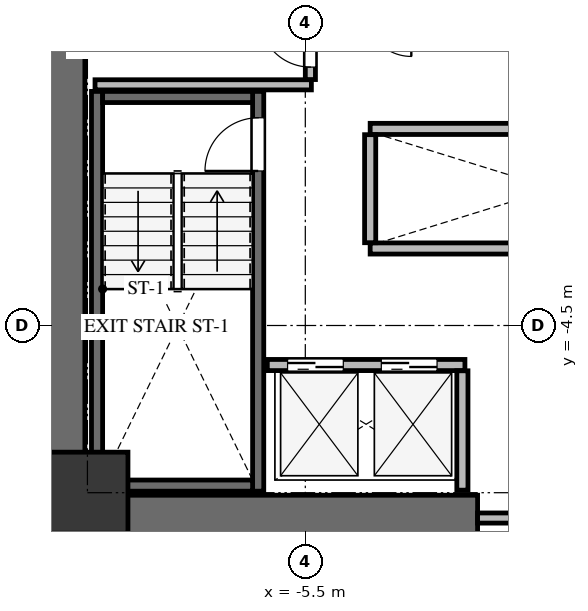
"""IFC4 building model, lengths in metres.
Left out: names, types, materials, properties, quantities, classifications, styles, units other than length and angle.
Written with IfcOpenShell. Run it as: python <this file> out.ifc"""

import sys

from ifc_helpers import new_model, si_unit, direction, frame, frame_2d, origin, origin_2d, place, context, subcontext, project, spatial, rectangle, extrude, source, transform, mapped, element, fill, save


model = new_model("IFC4")
c1 = context("Model", 3, precision=1e-05, world=origin(), true_north=direction((0.0, 1.0)))
c2 = subcontext(c1, "Body", "Model", "MODEL_VIEW")
j1 = project(units=[si_unit("LENGTHUNIT", "METRE"), si_unit("PLANEANGLEUNIT", "RADIAN")], contexts=[c1])
p1 = place(None, origin())
s1 = spatial("IfcSite", under=j1, at=p1, CompositionType="ELEMENT")
p2 = place(p1, origin())
s2 = spatial("IfcBuilding", under=s1, at=p2, CompositionType="ELEMENT")
p3 = place(p2, frame((0.0, 0.0, 75.3)))
s3 = spatial("IfcBuildingStorey", under=s2, at=p3, CompositionType="ELEMENT", Elevation=75.3)
p4 = place(p3, frame((-10.3, -8.75, 0.0), z_axis=(0.0, 0.0, 1.0), x_axis=(0.0, 1.0, 0.0)))
e1 = element("IfcWall", 1, at=p4, inside=s3, PredefinedType="SHEAR", context=c2, shape_type="SweptSolid", body=[
    extrude(rectangle(XDim=17.5, YDim=0.9, at=frame_2d((8.75, 0.0))), origin(), (0.0, 0.0, 1.0), 3.0),
])
p5 = place(p3, frame((-9.85, -8.3, 0.0), z_axis=(0.0, 0.0, 1.0), x_axis=(1.0, 0.0, 0.0)))
e2 = element("IfcWall", 2, at=p5, inside=s3, PredefinedType="SHEAR", context=c2, shape_type="SweptSolid", body=[
    extrude(rectangle(XDim=7.75, YDim=0.9, at=frame_2d((3.875, 0.0))), origin(), (0.0, 0.0, 1.0), 3.0),
])
p6 = place(p3, frame((-6.43, -7.77, -0.24), z_axis=(0.0, 0.0, 1.0), x_axis=(0.0, 1.0, 0.0)))
e3 = element("IfcWall", 3, at=p6, inside=s3, PredefinedType="SHEAR", context=c2, shape_type="SweptSolid", body=[
    extrude(rectangle(XDim=7.89, YDim=0.22, at=frame_2d((3.945, 0.0))), origin(), (0.0, 0.0, 1.0), 3.0),
])
p7 = place(p6, frame((6.32, 0.0, 0.0)))
e4 = element("IfcOpeningElement", 4, at=p7, cuts=e3, PredefinedType="OPENING", context=c2, shape_type="SweptSolid", body=[
    extrude(rectangle(XDim=1.05, YDim=2.15, at=frame_2d((0.525, 1.075))), frame((0.0, 0.12, 0.0), z_axis=(0.0, -1.0, 0.0), x_axis=(1.0, 0.0, 0.0)), (0.0, 0.0, 1.0), 0.24),
])
p8 = place(p3, frame((-9.61, 0.12, -0.24), z_axis=(0.0, 0.0, 1.0), x_axis=(0.0, -1.0, 0.0)))
e5 = element("IfcWall", 5, at=p8, inside=s3, PredefinedType="SHEAR", context=c2, shape_type="SweptSolid", body=[
    extrude(rectangle(XDim=7.89, YDim=0.22, at=frame_2d((3.945, 0.0))), origin(), (0.0, 0.0, 1.0), 3.0),
])
for number, where, z_axis, x_axis in (
    (6, (-9.5, -7.66, -0.24), (0.0, 0.0, 1.0), (1.0, 0.0, 0.0)),
    (7, (-6.54, 0.01, -0.24), (0.0, 0.0, 1.0), (-1.0, 0.0, 0.0)),
):
    element("IfcWall", number, at=place(p3, frame(where, z_axis=z_axis, x_axis=x_axis)), inside=s3, PredefinedType="SHEAR", context=c2, shape_type="SweptSolid", body=[
        extrude(rectangle(XDim=2.96, YDim=0.22, at=frame_2d((1.48, 0.0))), origin(), (0.0, 0.0, 1.0), 3.0),
    ])
m1 = source(origin(), c2, "Body", "SweptSolid", [
    extrude(rectangle(XDim=1.6, YDim=1.6, at=origin_2d()), origin(), (0.0, 0.0, 1.0), 3.0),
])
p9 = place(p3, frame((-9.8, -7.8, -0.24), z_axis=(0.0, 0.0, 1.0), x_axis=(1.0, 0.0, 0.0)))
e8 = element("IfcColumn", 8, at=p9, inside=s3, PredefinedType="COLUMN", context=c2, shape_type="MappedRepresentation", body=[
    mapped(m1, transform((0.0, 0.0, 0.0), x_axis=(1.0, 0.0, 0.0), y_axis=(0.0, 1.0, 0.0), z_axis=(0.0, 0.0, 1.0), scale=1.0)),
])
p10 = place(p3, frame((-2.1, -8.3, 0.0), z_axis=(0.0, 0.0, 1.0), x_axis=(1.0, 0.0, 0.0)))
e9 = element("IfcWall", 9, at=p10, inside=s3, PredefinedType="SOLIDWALL", context=c2, shape_type="SweptSolid", body=[
    extrude(rectangle(XDim=4.2, YDim=0.2, at=frame_2d((2.1, 0.0))), origin(), (0.0, 0.0, 1.0), 2.745),
])
p11 = place(p10, frame((1.2, 0.0, 0.0)))
e10 = element("IfcOpeningElement", 10, at=p11, cuts=e9, PredefinedType="OPENING", context=c2, shape_type="SweptSolid", body=[
    extrude(rectangle(XDim=1.8, YDim=2.15, at=frame_2d((0.9, 1.075))), frame((0.0, 0.11, 0.0), z_axis=(0.0, -1.0, 0.0), x_axis=(1.0, 0.0, 0.0)), (0.0, 0.0, 1.0), 0.22),
])
p12 = place(p3, frame((-9.65, 0.25, 0.0), z_axis=(0.0, 0.0, 1.0), x_axis=(1.0, 0.0, 0.0)))
e11 = element("IfcWall", 11, at=p12, inside=s3, PredefinedType="SOLIDWALL", context=c2, shape_type="SweptSolid", body=[
    extrude(rectangle(XDim=4.27, YDim=0.2, at=frame_2d((2.135, 0.0))), origin(), (0.0, 0.0, 1.0), 2.745),
])
p13 = place(p3, frame((-5.4, 0.354, 0.0), z_axis=(0.0, 0.0, 1.0), x_axis=(0.0, 1.0, 0.0)))
e12 = element("IfcWall", 12, at=p13, inside=s3, PredefinedType="SOLIDWALL", context=c2, shape_type="SweptSolid", body=[
    extrude(rectangle(XDim=4.026, YDim=0.2, at=frame_2d((2.013, 0.0))), origin(), (0.0, 0.0, 1.0), 2.745),
])
p14 = place(p13, frame((0.246, 0.0, 0.0)))
e13 = element("IfcOpeningElement", 13, at=p14, cuts=e12, PredefinedType="OPENING", context=c2, shape_type="SweptSolid", body=[
    extrude(rectangle(XDim=1.0, YDim=2.15, at=frame_2d((0.5, 1.075))), frame((0.0, 0.11, 0.0), z_axis=(0.0, -1.0, 0.0), x_axis=(1.0, 0.0, 0.0)), (0.0, 0.0, 1.0), 0.22),
])
p15 = place(p3, frame((-6.25, -5.28, 0.0), z_axis=(0.0, 0.0, 1.0), x_axis=(1.0, 0.0, 0.0)))
e14 = element("IfcWall", 14, at=p15, inside=s3, PredefinedType="SOLIDWALL", context=c2, shape_type="SweptSolid", body=[
    extrude(rectangle(XDim=3.9, YDim=0.22, at=frame_2d((1.95, 0.0))), origin(), (0.0, 0.0, 1.0), 2.745),
])
p16 = place(p15, frame((0.4, 0.0, 0.0)))
e15 = element("IfcOpeningElement", 15, at=p16, cuts=e14, PredefinedType="OPENING", context=c2, shape_type="SweptSolid", body=[
    extrude(rectangle(XDim=1.1, YDim=2.15, at=frame_2d((0.55, 1.075))), frame((0.0, 0.12, 0.0), z_axis=(0.0, -1.0, 0.0), x_axis=(1.0, 0.0, 0.0)), (0.0, 0.0, 1.0), 0.24),
])
p17 = place(p15, frame((2.25, 0.0, 0.0)))
e16 = element("IfcOpeningElement", 16, at=p17, cuts=e14, PredefinedType="OPENING", context=c2, shape_type="SweptSolid", body=[
    extrude(rectangle(XDim=1.1, YDim=2.15, at=frame_2d((0.55, 1.075))), frame((0.0, 0.12, 0.0), z_axis=(0.0, -1.0, 0.0), x_axis=(1.0, 0.0, 0.0)), (0.0, 0.0, 1.0), 0.24),
])
p18 = place(p3, frame((-2.4, -7.75, 0.0), z_axis=(0.0, 0.0, 1.0), x_axis=(0.0, 1.0, 0.0)))
e17 = element("IfcWall", 17, at=p18, inside=s3, PredefinedType="SOLIDWALL", context=c2, shape_type="SweptSolid", body=[
    extrude(rectangle(XDim=2.356, YDim=0.22, at=frame_2d((1.178, 0.0))), origin(), (0.0, 0.0, 1.0), 2.745),
])
for number, where, z_axis, x_axis in (
    (18, (-4.22, -2.98, 0.0), (0.0, 0.0, 1.0), (1.0, 0.0, 0.0)),
    (19, (-4.22, -0.62, 0.0), (0.0, 0.0, 1.0), (1.0, 0.0, 0.0)),
):
    element("IfcWall", number, at=place(p3, frame(where, z_axis=z_axis, x_axis=x_axis)), inside=s3, PredefinedType="SOLIDWALL", context=c2, shape_type="SweptSolid", body=[
        extrude(rectangle(XDim=7.24, YDim=0.22, at=frame_2d((3.62, 0.0))), origin(), (0.0, 0.0, 1.0), 2.745),
    ])
p19 = place(p3, frame((-4.22, -2.866, 0.0), z_axis=(0.0, 0.0, 1.0), x_axis=(0.0, 1.0, 0.0)))
e20 = element("IfcWall", 20, at=p19, inside=s3, PredefinedType="SOLIDWALL", context=c2, shape_type="SweptSolid", body=[
    extrude(rectangle(XDim=2.132, YDim=0.22, at=frame_2d((1.066, 0.0))), origin(), (0.0, 0.0, 1.0), 2.745),
])
m2 = source(origin(), c2, "Body", "SweptSolid", [
    extrude(rectangle(XDim=1.05, YDim=2.15, at=frame_2d((0.525, 1.075))), frame((0.0, 0.025, 0.0), z_axis=(0.0, -1.0, 0.0), x_axis=(1.0, 0.0, 0.0)), (0.0, 0.0, 1.0), 0.05),
])
p20 = place(p7, origin())
e21 = element("IfcDoor", 21, at=p20, inside=s3, OperationType="SINGLE_SWING_LEFT", PredefinedType="DOOR", context=c2, shape_type="MappedRepresentation", body=[
    mapped(m2, transform((0.0, 0.0, 0.0), x_axis=(1.0, 0.0, 0.0), y_axis=(0.0, 1.0, 0.0), z_axis=(0.0, 0.0, 1.0), scale=1.0)),
])
fill(e4, e21)
m3 = source(origin(), c2, "Body", "SweptSolid", [
    extrude(rectangle(XDim=1.0, YDim=2.15, at=frame_2d((0.5, 1.075))), frame((0.0, 0.025, 0.0), z_axis=(0.0, -1.0, 0.0), x_axis=(1.0, 0.0, 0.0)), (0.0, 0.0, 1.0), 0.05),
])
p21 = place(p14, origin())
e22 = element("IfcDoor", 22, at=p21, inside=s3, OperationType="SINGLE_SWING_RIGHT", PredefinedType="DOOR", context=c2, shape_type="MappedRepresentation", body=[
    mapped(m3, transform((0.0, 0.0, 0.0), x_axis=(1.0, 0.0, 0.0), y_axis=(0.0, 1.0, 0.0), z_axis=(0.0, 0.0, 1.0), scale=1.0)),
])
fill(e13, e22)
m4 = source(origin(), c2, "Body", "SweptSolid", [
    extrude(rectangle(XDim=1.1, YDim=2.15, at=frame_2d((0.55, 1.075))), frame((0.0, 0.025, 0.0), z_axis=(0.0, -1.0, 0.0), x_axis=(1.0, 0.0, 0.0)), (0.0, 0.0, 1.0), 0.05),
])
p22 = place(p16, origin())
e23 = element("IfcDoor", 23, at=p22, inside=s3, OperationType="DOUBLE_DOOR_SLIDING", PredefinedType="DOOR", context=c2, shape_type="MappedRepresentation", body=[
    mapped(m4, transform((0.0, 0.0, 0.0), x_axis=(1.0, 0.0, 0.0), y_axis=(0.0, 1.0, 0.0), z_axis=(0.0, 0.0, 1.0), scale=1.0)),
])
fill(e15, e23)
p23 = place(p17, origin())
e24 = element("IfcDoor", 24, at=p23, inside=s3, OperationType="DOUBLE_DOOR_SLIDING", PredefinedType="DOOR", context=c2, shape_type="MappedRepresentation", body=[
    mapped(m4, transform((0.0, 0.0, 0.0), x_axis=(1.0, 0.0, 0.0), y_axis=(0.0, 1.0, 0.0), z_axis=(0.0, 0.0, 1.0), scale=1.0)),
])
fill(e16, e24)
save(model, sys.argv[1])
